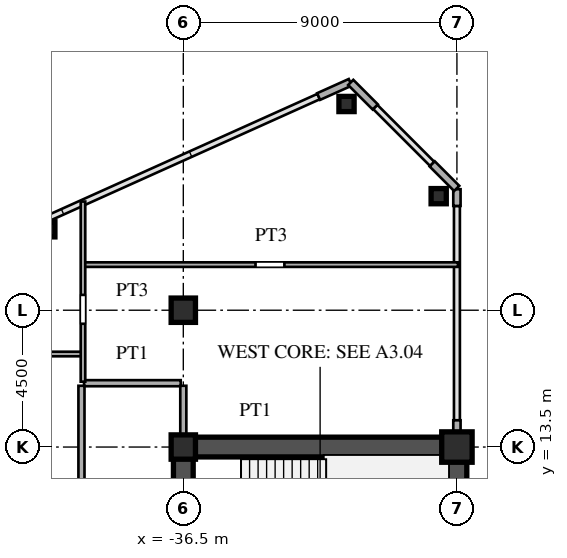
"""IFC4 building model, lengths in metres.
Left out: names, types, materials, properties, quantities, classifications, styles, units other than length and angle.
Written with IfcOpenShell. Run it as: python <this file> out.ifc"""

import sys

from ifc_helpers import new_model, si_unit, direction, frame, frame_2d, origin, origin_2d, place, context, subcontext, project, spatial, rectangle, hollow_rectangle, i_section, extrude, source, transform, mapped, element, save


model = new_model("IFC4")
c1 = context("Model", 3, precision=1e-05, world=origin(), true_north=direction((0.0, 1.0)))
c2 = subcontext(c1, "Body", "Model", "MODEL_VIEW")
j1 = project(units=[si_unit("LENGTHUNIT", "METRE"), si_unit("PLANEANGLEUNIT", "RADIAN")], contexts=[c1])
p1 = place(None, origin())
s1 = spatial("IfcSite", under=j1, at=p1, CompositionType="ELEMENT")
p2 = place(p1, origin())
s2 = spatial("IfcBuilding", under=s1, at=p2, CompositionType="ELEMENT")
p3 = place(p2, frame((0.0, 0.0, 83.7)))
s3 = spatial("IfcBuildingStorey", under=s2, at=p3, CompositionType="ELEMENT", Elevation=83.7)
m1 = source(origin(), c2, "Body", "SweptSolid", [
    extrude(hollow_rectangle(XDim=1.0, YDim=1.0, WallThickness=0.042, at=origin_2d()), origin(), (0.0, 0.0, 1.0), 3.6),
])
p4 = place(p3, frame((-27.5, 13.5, 0.0), z_axis=(0.0, 0.0, 1.0), x_axis=(1.0, 0.0, 0.0)))
e1 = element("IfcColumn", 1, at=p4, inside=s3, PredefinedType="COLUMN", context=c2, shape_type="MappedRepresentation", body=[
    mapped(m1, transform((0.0, 0.0, 0.0), scale=1.0)),
])
m2 = source(origin(), c2, "Body", "SweptSolid", [
    extrude(i_section(OverallWidth=0.8, OverallDepth=0.8, WebThickness=0.032, FlangeThickness=0.05, at=origin_2d()), origin(), (0.0, 0.0, 1.0), 3.6),
])
for number, where, z_axis, x_axis in (
    (2, (-36.5, 13.5, 0.0), (0.0, 0.0, 1.0), (1.0, 0.0, 0.0)),
    (3, (-36.5, 18.0, 0.0), (0.0, 0.0, 1.0), (1.0, 0.0, 0.0)),
):
    element("IfcColumn", number, at=place(p3, frame(where, z_axis=z_axis, x_axis=x_axis)), inside=s3, PredefinedType="COLUMN", context=c2, shape_type="MappedRepresentation", body=[
        mapped(m2, transform((0.0, 0.0, 0.0), scale=1.0)),
    ])
m3 = source(origin(), c2, "Body", "SweptSolid", [
    extrude(hollow_rectangle(XDim=0.5, YDim=0.5, WallThickness=0.02, at=origin_2d()), origin(), (0.0, 0.0, 1.0), 3.6),
])
for number, where, z_axis, x_axis in (
    (4, (-28.1, 21.751, 0.0), (0.0, 0.0, 1.0), (1.0, 0.0, 0.0)),
    (5, (-31.131, 24.783, 0.0), (0.0, 0.0, 1.0), (1.0, 0.0, 0.0)),
    (6, (-40.973, 20.661, 0.0), (0.0, 0.0, 1.0), (1.0, 0.0, 0.0)),
):
    element("IfcColumn", number, at=place(p3, frame(where, z_axis=z_axis, x_axis=x_axis)), inside=s3, PredefinedType="COLUMN", context=c2, shape_type="MappedRepresentation", body=[
        mapped(m3, transform((0.0, 0.0, 0.0), scale=1.0)),
    ])
p5 = place(p3, frame((-27.5, 13.83, 0.0), z_axis=(0.0, 0.0, 1.0), x_axis=(0.0, 1.0, 0.0)))
e7 = element("IfcWall", 7, at=p5, inside=s3, PredefinedType="SOLIDWALL", context=c2, shape_type="SweptSolid", body=[
    extrude(rectangle(XDim=0.55, YDim=0.24, at=frame_2d((0.275, 0.0))), origin(), (0.0, 0.0, 1.0), 2.84),
])
p6 = place(p3, frame((-27.5, 21.43, 0.0), z_axis=(0.0, 0.0, 1.0), x_axis=(0.0, 1.0, 0.0)))
e8 = element("IfcWall", 8, at=p6, inside=s3, PredefinedType="SOLIDWALL", context=c2, shape_type="SweptSolid", body=[
    extrude(rectangle(XDim=0.55, YDim=0.24, at=frame_2d((0.275, 0.0))), origin(), (0.0, 0.0, 1.0), 3.34),
])
for number, where, z_axis, x_axis in (
    (9, (-27.507, 22.007, 0.0), (0.0, 0.0, 1.0), (-0.707, 0.707, 0.0)),
    (10, (-30.187, 24.687, 0.0), (0.0, 0.0, 1.0), (-0.707, 0.707, 0.0)),
):
    element("IfcWall", number, at=place(p3, frame(where, z_axis=z_axis, x_axis=x_axis)), inside=s3, PredefinedType="SOLIDWALL", context=c2, shape_type="SweptSolid", body=[
        extrude(rectangle(XDim=1.14, YDim=0.24, at=frame_2d((0.57, 0.0))), origin(), (0.0, 0.0, 1.0), 3.34),
    ])
p7 = place(p3, frame((-31.009, 25.496, 0.0), z_axis=(0.0, 0.0, 1.0), x_axis=(-0.911929519623, -0.410346866979, 0.0)))
e11 = element("IfcWall", 11, at=p7, inside=s3, PredefinedType="SOLIDWALL", context=c2, shape_type="SweptSolid", body=[
    extrude(rectangle(XDim=1.14, YDim=0.24, at=frame_2d((0.57, 0.0))), origin(), (0.0, 0.0, 1.0), 3.34),
])
p8 = place(p3, frame((-27.5, 1.3, 0.0), z_axis=(0.0, 0.0, 1.0), x_axis=(0.0, 1.0, 0.0)))
e12 = element("IfcWall", 12, at=p8, inside=s3, PredefinedType="SHEAR", context=c2, shape_type="SweptSolid", body=[
    extrude(rectangle(XDim=12.2, YDim=0.65, at=frame_2d((6.1, 0.0))), origin(), (0.0, 0.0, 1.0), 3.34),
])
p9 = place(p3, frame((-36.5, 13.5, 0.0), z_axis=(0.0, 0.0, 1.0), x_axis=(1.0, 0.0, 0.0)))
e13 = element("IfcWall", 13, at=p9, inside=s3, PredefinedType="SHEAR", context=c2, shape_type="SweptSolid", body=[
    extrude(rectangle(XDim=9.0, YDim=0.65, at=frame_2d((4.5, 0.0))), origin(), (0.0, 0.0, 1.0), 3.34),
])
p10 = place(p3, frame((-36.5, 8.2, 0.0), z_axis=(0.0, 0.0, 1.0), x_axis=(0.0, 1.0, 0.0)))
e14 = element("IfcWall", 14, at=p10, inside=s3, PredefinedType="SHEAR", context=c2, shape_type="SweptSolid", body=[
    extrude(rectangle(XDim=5.45, YDim=0.65, at=frame_2d((2.725, 0.0))), origin(), (0.0, 0.0, 1.0), 3.34),
])
p11 = place(p10, frame((0.245, 0.0, 0.0)))
e15 = element("IfcOpeningElement", 15, at=p11, cuts=e14, PredefinedType="OPENING", context=c2, shape_type="SweptSolid", body=[
    extrude(rectangle(XDim=0.95, YDim=2.15, at=frame_2d((0.475, 1.075))), frame((0.0, 0.335, 0.0), z_axis=(0.0, -1.0, 0.0), x_axis=(1.0, 0.0, 0.0)), (0.0, 0.0, 1.0), 0.67),
])
p12 = place(p3, frame((-39.765, 15.6, 0.0), z_axis=(0.0, 0.0, 1.0), x_axis=(1.0, 0.0, 0.0)))
e16 = element("IfcWall", 16, at=p12, inside=s3, PredefinedType="PARTITIONING", context=c2, shape_type="SweptSolid", body=[
    extrude(rectangle(XDim=3.18, YDim=0.2, at=frame_2d((1.59, 0.0))), origin(), (0.0, 0.0, 1.0), 3.34),
])
p13 = place(p3, frame((-45.45, 16.56, 0.0), z_axis=(0.0, 0.0, 1.0), x_axis=(1.0, 0.0, 0.0)))
e17 = element("IfcWall", 17, at=p13, inside=s3, PredefinedType="PARTITIONING", context=c2, shape_type="SweptSolid", body=[
    extrude(rectangle(XDim=5.6, YDim=0.15, at=frame_2d((2.8, 0.0))), origin(), (0.0, 0.0, 1.0), 3.34),
])
p14 = place(p3, frame((-39.75, 19.5, 0.0), z_axis=(0.0, 0.0, 1.0), x_axis=(1.0, 0.0, 0.0)))
e18 = element("IfcWall", 18, at=p14, inside=s3, PredefinedType="PARTITIONING", context=c2, shape_type="SweptSolid", body=[
    extrude(rectangle(XDim=12.285, YDim=0.15, at=frame_2d((6.143, 0.0))), origin(), (0.0, 0.0, 1.0), 3.34),
])
p15 = place(p14, frame((5.625, 0.0, 0.0)))
e19 = element("IfcOpeningElement", 19, at=p15, cuts=e18, PredefinedType="OPENING", context=c2, shape_type="SweptSolid", body=[
    extrude(rectangle(XDim=0.95, YDim=2.15, at=frame_2d((0.475, 1.075))), frame((0.0, 0.085, 0.0), z_axis=(0.0, -1.0, 0.0), x_axis=(1.0, 0.0, 0.0)), (0.0, 0.0, 1.0), 0.17),
])
p16 = place(p3, frame((-39.85, -15.515, 0.0), z_axis=(0.0, 0.0, 1.0), x_axis=(0.0, 1.0, 0.0)))
e20 = element("IfcWall", 20, at=p16, inside=s3, PredefinedType="PARTITIONING", context=c2, shape_type="SweptSolid", body=[
    extrude(rectangle(XDim=31.03, YDim=0.2, at=frame_2d((15.515, 0.0))), origin(), (0.0, 0.0, 1.0), 3.34),
])
p17 = place(p16, frame((2.44, 0.0, 0.0)))
e21 = element("IfcOpeningElement", 21, at=p17, cuts=e20, PredefinedType="OPENING", context=c2, shape_type="SweptSolid", body=[
    extrude(rectangle(XDim=1.05, YDim=2.25, at=frame_2d((0.525, 1.125))), frame((0.0, 0.11, 0.0), z_axis=(0.0, -1.0, 0.0), x_axis=(1.0, 0.0, 0.0)), (0.0, 0.0, 1.0), 0.22),
])
p18 = place(p16, frame((12.28, 0.0, 0.0)))
e22 = element("IfcOpeningElement", 22, at=p18, cuts=e20, PredefinedType="OPENING", context=c2, shape_type="SweptSolid", body=[
    extrude(rectangle(XDim=1.05, YDim=2.25, at=frame_2d((0.525, 1.125))), frame((0.0, 0.11, 0.0), z_axis=(0.0, -1.0, 0.0), x_axis=(1.0, 0.0, 0.0)), (0.0, 0.0, 1.0), 0.22),
])
p19 = place(p16, frame((25.067, 0.0, 0.0)))
e23 = element("IfcOpeningElement", 23, at=p19, cuts=e20, PredefinedType="OPENING", context=c2, shape_type="SweptSolid", body=[
    extrude(rectangle(XDim=1.05, YDim=2.25, at=frame_2d((0.525, 1.125))), frame((0.0, 0.11, 0.0), z_axis=(0.0, -1.0, 0.0), x_axis=(1.0, 0.0, 0.0)), (0.0, 0.0, 1.0), 0.22),
])
p20 = place(p3, frame((-39.8, 15.65, 0.0), z_axis=(0.0, 0.0, 1.0), x_axis=(0.0, 1.0, 0.0)))
e24 = element("IfcWall", 24, at=p20, inside=s3, PredefinedType="PARTITIONING", context=c2, shape_type="SweptSolid", body=[
    extrude(rectangle(XDim=5.925, YDim=0.15, at=frame_2d((2.962, 0.0))), origin(), (0.0, 0.0, 1.0), 3.34),
])
p21 = place(p20, frame((1.904, 0.0, 0.0)))
e25 = element("IfcOpeningElement", 25, at=p21, cuts=e24, PredefinedType="OPENING", context=c2, shape_type="SweptSolid", body=[
    extrude(rectangle(XDim=0.95, YDim=2.15, at=frame_2d((0.475, 1.075))), frame((0.0, 0.085, 0.0), z_axis=(0.0, -1.0, 0.0), x_axis=(1.0, 0.0, 0.0)), (0.0, 0.0, 1.0), 0.17),
])
p22 = place(p3, frame((-36.5, 13.83, 0.0), z_axis=(0.0, 0.0, 1.0), x_axis=(0.0, 1.0, 0.0)))
e26 = element("IfcWall", 26, at=p22, inside=s3, PredefinedType="PARTITIONING", context=c2, shape_type="SweptSolid", body=[
    extrude(rectangle(XDim=1.685, YDim=0.2, at=frame_2d((0.842, 0.0))), origin(), (0.0, 0.0, 1.0), 2.44),
])
save(model, sys.argv[1])
